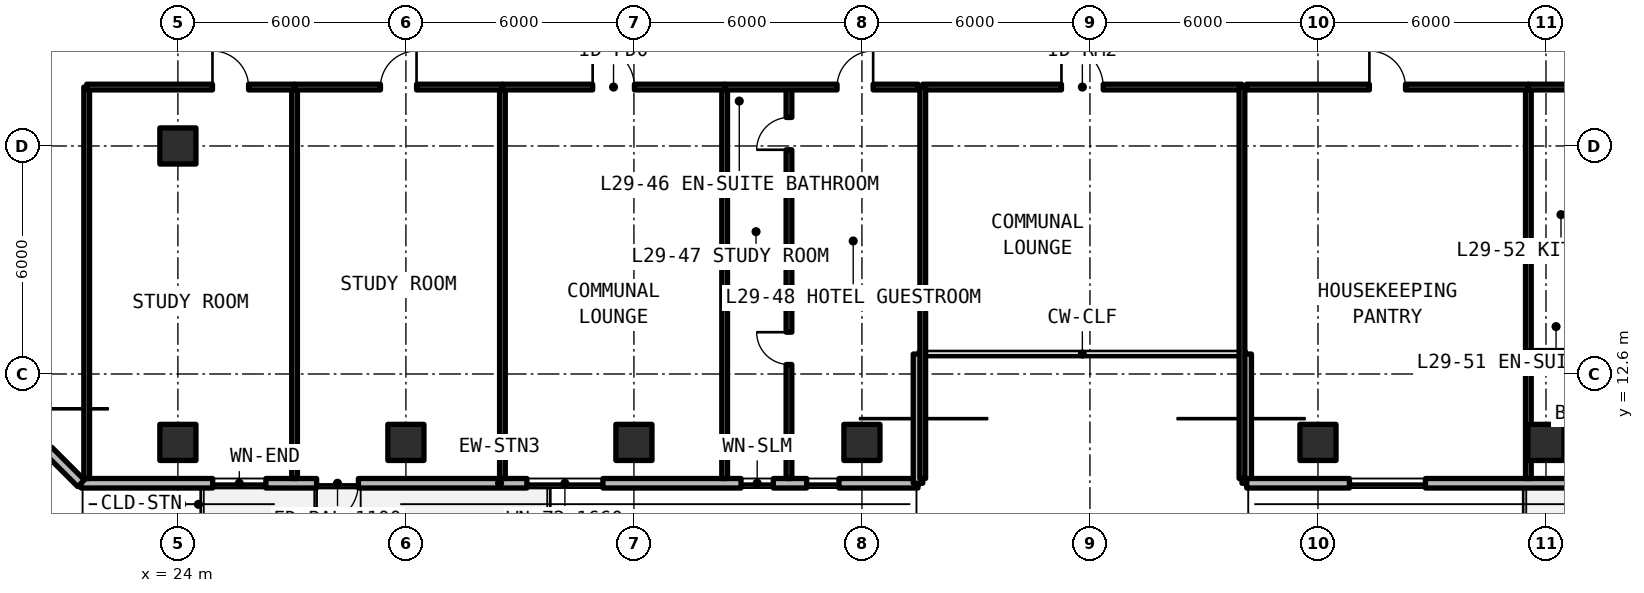
"""IFC4 building model, lengths in metres.
Left out: names, types, materials, properties, quantities, classifications, styles, units other than length and angle.
Written with IfcOpenShell. Run it as: python <this file> out.ifc"""

import sys

from ifc_helpers import new_model, si_unit, direction, frame, frame_2d, origin, origin_2d, place, context, subcontext, project, spatial, rectangle, extrude, element, fill, save


model = new_model("IFC4")
c1 = context("Model", 3, precision=1e-05, world=origin(), true_north=direction((0.0, 1.0)))
c2 = subcontext(c1, "Body", "Model", "MODEL_VIEW")
j1 = project(units=[si_unit("LENGTHUNIT", "METRE"), si_unit("PLANEANGLEUNIT", "RADIAN")], contexts=[c1])
p1 = place(None, origin())
s1 = spatial("IfcSite", under=j1, at=p1, CompositionType="ELEMENT")
p2 = place(p1, origin())
s2 = spatial("IfcBuilding", under=s1, at=p2, CompositionType="ELEMENT")
p3 = place(p2, frame((0.0, 0.0, 105.27)))
s3 = spatial("IfcBuildingStorey", under=s2, at=p3, CompositionType="ELEMENT", Elevation=105.27)
for number, where, z_axis, x_axis in (
    (1, (24.0, 18.6, 0.0), (0.0, 0.0, 1.0), (1.0, 0.0, 0.0)),
    (2, (24.0, 10.8, 0.0), (0.0, 0.0, 1.0), (1.0, 0.0, 0.0)),
    (3, (30.0, 10.8, 0.0), (0.0, 0.0, 1.0), (1.0, 0.0, 0.0)),
    (4, (36.0, 10.8, 0.0), (0.0, 0.0, 1.0), (1.0, 0.0, 0.0)),
    (5, (42.0, 10.8, 0.0), (0.0, 0.0, 1.0), (1.0, 0.0, 0.0)),
    (6, (54.0, 10.8, 0.0), (0.0, 0.0, 1.0), (1.0, 0.0, 0.0)),
    (7, (60.0, 10.8, 0.0), (0.0, 0.0, 1.0), (1.0, 0.0, 0.0)),
):
    element("IfcColumn", number, at=place(p3, frame(where, z_axis=z_axis, x_axis=x_axis)), inside=s3, PredefinedType="COLUMN", context=c2, shape_type="SweptSolid", body=[
        extrude(rectangle(XDim=0.95, YDim=0.95, at=origin_2d()), origin(), (0.0, 0.0, 1.0), 3.3),
    ])
p4 = place(p3, frame((21.452, 9.725, 0.0), z_axis=(0.0, 0.0, 1.0), x_axis=(1.0, 0.0, 0.0)))
e8 = element("IfcWall", 8, at=p4, inside=s3, PredefinedType="SOLIDWALL", context=c2, shape_type="SweptSolid", body=[
    extrude(rectangle(XDim=22.023, YDim=0.25, at=frame_2d((11.012, 0.0))), origin(), (0.0, 0.0, 1.0), 3.08),
])
p5 = place(p4, frame((6.198, 0.0, 0.0)))
e9 = element("IfcOpeningElement", 9, at=p5, cuts=e8, PredefinedType="OPENING", context=c2, shape_type="SweptSolid", body=[
    extrude(rectangle(XDim=1.1, YDim=2.15, at=frame_2d((0.55, 1.075))), frame((0.0, 0.135, 0.0), z_axis=(0.0, -1.0, 0.0), x_axis=(1.0, 0.0, 0.0)), (0.0, 0.0, 1.0), 0.27),
])
p6 = place(p4, frame((3.463, 0.0, 0.78)))
e10 = element("IfcOpeningElement", 10, at=p6, cuts=e8, PredefinedType="OPENING", context=c2, shape_type="SweptSolid", body=[
    extrude(rectangle(XDim=1.4, YDim=1.65, at=frame_2d((0.7, 0.825))), frame((0.0, 0.135, 0.0), z_axis=(0.0, -1.0, 0.0), x_axis=(1.0, 0.0, 0.0)), (0.0, 0.0, 1.0), 0.27),
])
p7 = place(p4, frame((11.732, 0.0, 0.78)))
e11 = element("IfcOpeningElement", 11, at=p7, cuts=e8, PredefinedType="OPENING", context=c2, shape_type="SweptSolid", body=[
    extrude(rectangle(XDim=2.0, YDim=1.66, at=frame_2d((1.0, 0.83))), frame((0.0, 0.135, 0.0), z_axis=(0.0, -1.0, 0.0), x_axis=(1.0, 0.0, 0.0)), (0.0, 0.0, 1.0), 0.27),
])
p8 = place(p4, frame((17.367, 0.0, 0.78)))
e12 = element("IfcOpeningElement", 12, at=p8, cuts=e8, PredefinedType="OPENING", context=c2, shape_type="SweptSolid", body=[
    extrude(rectangle(XDim=0.85, YDim=1.65, at=frame_2d((0.425, 0.825))), frame((0.0, 0.135, 0.0), z_axis=(0.0, -1.0, 0.0), x_axis=(1.0, 0.0, 0.0)), (0.0, 0.0, 1.0), 0.27),
])
p9 = place(p4, frame((19.093, 0.0, 0.78)))
e13 = element("IfcOpeningElement", 13, at=p9, cuts=e8, PredefinedType="OPENING", context=c2, shape_type="SweptSolid", body=[
    extrude(rectangle(XDim=0.85, YDim=1.65, at=frame_2d((0.425, 0.825))), frame((0.0, 0.135, 0.0), z_axis=(0.0, -1.0, 0.0), x_axis=(1.0, 0.0, 0.0)), (0.0, 0.0, 1.0), 0.27),
])
for number, where, z_axis, x_axis in (
    (14, (43.475, 9.725, 0.0), (0.0, 0.0, 1.0), (0.0, 1.0, 0.0)),
    (15, (52.125, 13.125, 0.0), (0.0, 0.0, 1.0), (0.0, -1.0, 0.0)),
):
    element("IfcWall", number, at=place(p3, frame(where, z_axis=z_axis, x_axis=x_axis)), inside=s3, PredefinedType="SOLIDWALL", context=c2, shape_type="SweptSolid", body=[
        extrude(rectangle(XDim=3.4, YDim=0.25, at=frame_2d((1.7, 0.0))), origin(), (0.0, 0.0, 1.0), 3.08),
    ])
p10 = place(p3, frame((52.125, 9.725, 0.0), z_axis=(0.0, 0.0, 1.0), x_axis=(1.0, 0.0, 0.0)))
e16 = element("IfcWall", 16, at=p10, inside=s3, PredefinedType="SOLIDWALL", context=c2, shape_type="SweptSolid", body=[
    extrude(rectangle(XDim=44.023, YDim=0.25, at=frame_2d((22.012, 0.0))), origin(), (0.0, 0.0, 1.0), 3.08),
])
p11 = place(p10, frame((11.075, 0.0, 0.0)))
e17 = element("IfcOpeningElement", 17, at=p11, cuts=e16, PredefinedType="OPENING", context=c2, shape_type="SweptSolid", body=[
    extrude(rectangle(XDim=1.1, YDim=2.15, at=frame_2d((0.55, 1.075))), frame((0.0, 0.135, 0.0), z_axis=(0.0, -1.0, 0.0), x_axis=(1.0, 0.0, 0.0)), (0.0, 0.0, 1.0), 0.27),
])
p12 = place(p10, frame((22.925, 0.0, 0.0)))
e18 = element("IfcOpeningElement", 18, at=p12, cuts=e16, PredefinedType="OPENING", context=c2, shape_type="SweptSolid", body=[
    extrude(rectangle(XDim=1.1, YDim=2.15, at=frame_2d((0.55, 1.075))), frame((0.0, 0.135, 0.0), z_axis=(0.0, -1.0, 0.0), x_axis=(1.0, 0.0, 0.0)), (0.0, 0.0, 1.0), 0.27),
])
p13 = place(p10, frame((35.525, 0.0, 0.0)))
e19 = element("IfcOpeningElement", 19, at=p13, cuts=e16, PredefinedType="OPENING", context=c2, shape_type="SweptSolid", body=[
    extrude(rectangle(XDim=1.1, YDim=2.15, at=frame_2d((0.55, 1.075))), frame((0.0, 0.135, 0.0), z_axis=(0.0, -1.0, 0.0), x_axis=(1.0, 0.0, 0.0)), (0.0, 0.0, 1.0), 0.27),
])
p14 = place(p10, frame((2.703, 0.0, 0.78)))
e20 = element("IfcOpeningElement", 20, at=p14, cuts=e16, PredefinedType="OPENING", context=c2, shape_type="SweptSolid", body=[
    extrude(rectangle(XDim=2.0, YDim=1.66, at=frame_2d((1.0, 0.83))), frame((0.0, 0.135, 0.0), z_axis=(0.0, -1.0, 0.0), x_axis=(1.0, 0.0, 0.0)), (0.0, 0.0, 1.0), 0.27),
])
p15 = place(p10, frame((28.964, 0.0, 0.78)))
e21 = element("IfcOpeningElement", 21, at=p15, cuts=e16, PredefinedType="OPENING", context=c2, shape_type="SweptSolid", body=[
    extrude(rectangle(XDim=2.0, YDim=1.66, at=frame_2d((1.0, 0.83))), frame((0.0, 0.135, 0.0), z_axis=(0.0, -1.0, 0.0), x_axis=(1.0, 0.0, 0.0)), (0.0, 0.0, 1.0), 0.27),
])
p16 = place(p3, frame((17.325, 13.852, 0.0), z_axis=(0.0, 0.0, 1.0), x_axis=(0.707127696864, -0.70708586489, 0.0)))
e22 = element("IfcWall", 22, at=p16, inside=s3, PredefinedType="SOLIDWALL", context=c2, shape_type="SweptSolid", body=[
    extrude(rectangle(XDim=5.836, YDim=0.25, at=frame_2d((2.918, 0.0))), origin(), (0.0, 0.0, 1.0), 3.08),
])
p17 = place(p16, frame((1.218, 0.0, 0.78)))
e23 = element("IfcOpeningElement", 23, at=p17, cuts=e22, PredefinedType="OPENING", context=c2, shape_type="SweptSolid", body=[
    extrude(rectangle(XDim=3.4, YDim=1.66, at=frame_2d((1.7, 0.83))), frame((0.0, 0.135, 0.0), z_axis=(0.0, -1.0, 0.0), x_axis=(1.0, 0.0, 0.0)), (0.0, 0.0, 1.0), 0.27),
])
p18 = place(p3, frame((43.6, 20.15, 0.0), z_axis=(0.0, 0.0, 1.0), x_axis=(1.0, 0.0, 0.0)))
e24 = element("IfcWall", 24, at=p18, inside=s3, PredefinedType="SOLIDWALL", context=c2, shape_type="SweptSolid", body=[
    extrude(rectangle(XDim=8.4, YDim=0.15, at=frame_2d((4.2, 0.0))), origin(), (0.0, 0.0, 1.0), 2.35),
])
p19 = place(p18, frame((3.65, 0.0, 0.0)))
e25 = element("IfcOpeningElement", 25, at=p19, cuts=e24, PredefinedType="OPENING", context=c2, shape_type="SweptSolid", body=[
    extrude(rectangle(XDim=1.1, YDim=2.15, at=frame_2d((0.55, 1.075))), frame((0.0, 0.085, 0.0), z_axis=(0.0, -1.0, 0.0), x_axis=(1.0, 0.0, 0.0)), (0.0, 0.0, 1.0), 0.17),
])
for number, where, z_axis, x_axis in (
    (26, (43.6, 9.85, 0.0), (0.0, 0.0, 1.0), (0.0, 1.0, 0.0)),
    (27, (52.0, 9.85, 0.0), (0.0, 0.0, 1.0), (0.0, 1.0, 0.0)),
    (28, (21.6, 9.85, 0.0), (0.0, 0.0, 1.0), (0.0, 1.0, 0.0)),
    (29, (27.07, 9.85, 0.0), (0.0, 0.0, 1.0), (0.0, 1.0, 0.0)),
):
    element("IfcWall", number, at=place(p3, frame(where, z_axis=z_axis, x_axis=x_axis)), inside=s3, PredefinedType="SOLIDWALL", context=c2, shape_type="SweptSolid", body=[
        extrude(rectangle(XDim=10.3, YDim=0.15, at=frame_2d((5.15, 0.0))), origin(), (0.0, 0.0, 1.0), 2.35),
    ])
p20 = place(p3, frame((21.6, 20.15, 0.0), z_axis=(0.0, 0.0, 1.0), x_axis=(1.0, 0.0, 0.0)))
e30 = element("IfcWall", 30, at=p20, inside=s3, PredefinedType="SOLIDWALL", context=c2, shape_type="SweptSolid", body=[
    extrude(rectangle(XDim=5.47, YDim=0.15, at=frame_2d((2.735, 0.0))), origin(), (0.0, 0.0, 1.0), 2.35),
])
p21 = place(p20, frame((3.31, 0.0, 0.0)))
e31 = element("IfcOpeningElement", 31, at=p21, cuts=e30, PredefinedType="OPENING", context=c2, shape_type="SweptSolid", body=[
    extrude(rectangle(XDim=0.95, YDim=2.15, at=frame_2d((0.475, 1.075))), frame((0.0, 0.085, 0.0), z_axis=(0.0, -1.0, 0.0), x_axis=(1.0, 0.0, 0.0)), (0.0, 0.0, 1.0), 0.17),
])
p22 = place(p3, frame((32.54, 9.85, 0.0), z_axis=(0.0, 0.0, 1.0), x_axis=(0.0, 1.0, 0.0)))
e32 = element("IfcWall", 32, at=p22, inside=s3, PredefinedType="SOLIDWALL", context=c2, shape_type="SweptSolid", body=[
    extrude(rectangle(XDim=10.3, YDim=0.15, at=frame_2d((5.15, 0.0))), origin(), (0.0, 0.0, 1.0), 2.35),
])
p23 = place(p3, frame((27.07, 20.15, 0.0), z_axis=(0.0, 0.0, 1.0), x_axis=(1.0, 0.0, 0.0)))
e33 = element("IfcWall", 33, at=p23, inside=s3, PredefinedType="SOLIDWALL", context=c2, shape_type="SweptSolid", body=[
    extrude(rectangle(XDim=5.47, YDim=0.15, at=frame_2d((2.735, 0.0))), origin(), (0.0, 0.0, 1.0), 2.35),
])
p24 = place(p23, frame((2.26, 0.0, 0.0)))
e34 = element("IfcOpeningElement", 34, at=p24, cuts=e33, PredefinedType="OPENING", context=c2, shape_type="SweptSolid", body=[
    extrude(rectangle(XDim=0.95, YDim=2.15, at=frame_2d((0.475, 1.075))), frame((0.0, 0.085, 0.0), z_axis=(0.0, -1.0, 0.0), x_axis=(1.0, 0.0, 0.0)), (0.0, 0.0, 1.0), 0.17),
])
p25 = place(p3, frame((38.387, 9.85, 0.0), z_axis=(0.0, 0.0, 1.0), x_axis=(0.0, 1.0, 0.0)))
e35 = element("IfcWall", 35, at=p25, inside=s3, PredefinedType="SOLIDWALL", context=c2, shape_type="SweptSolid", body=[
    extrude(rectangle(XDim=10.3, YDim=0.15, at=frame_2d((5.15, 0.0))), origin(), (0.0, 0.0, 1.0), 2.35),
])
p26 = place(p3, frame((32.54, 20.15, 0.0), z_axis=(0.0, 0.0, 1.0), x_axis=(1.0, 0.0, 0.0)))
e36 = element("IfcWall", 36, at=p26, inside=s3, PredefinedType="SOLIDWALL", context=c2, shape_type="SweptSolid", body=[
    extrude(rectangle(XDim=5.847, YDim=0.15, at=frame_2d((2.924, 0.0))), origin(), (0.0, 0.0, 1.0), 2.35),
])
p27 = place(p26, frame((2.374, 0.0, 0.0)))
e37 = element("IfcOpeningElement", 37, at=p27, cuts=e36, PredefinedType="OPENING", context=c2, shape_type="SweptSolid", body=[
    extrude(rectangle(XDim=1.1, YDim=2.15, at=frame_2d((0.55, 1.075))), frame((0.0, 0.085, 0.0), z_axis=(0.0, -1.0, 0.0), x_axis=(1.0, 0.0, 0.0)), (0.0, 0.0, 1.0), 0.17),
])
p28 = place(p3, frame((38.387, 17.7, 0.0), z_axis=(0.0, 0.0, 1.0), x_axis=(1.0, 0.0, 0.0)))
e38 = element("IfcWall", 38, at=p28, inside=s3, PredefinedType="PARTITIONING", context=c2, shape_type="SweptSolid", body=[
    extrude(rectangle(XDim=1.693, YDim=0.15, at=frame_2d((0.846, 0.0))), origin(), (0.0, 0.0, 1.0), 2.35),
])
p29 = place(p3, frame((40.08, 9.85, 0.0), z_axis=(0.0, 0.0, 1.0), x_axis=(0.0, 1.0, 0.0)))
e39 = element("IfcWall", 39, at=p29, inside=s3, PredefinedType="PARTITIONING", context=c2, shape_type="SweptSolid", body=[
    extrude(rectangle(XDim=10.3, YDim=0.15, at=frame_2d((5.15, 0.0))), origin(), (0.0, 0.0, 1.0), 2.35),
])
p30 = place(p29, frame((3.0, 0.0, 0.0)))
e40 = element("IfcOpeningElement", 40, at=p30, cuts=e39, PredefinedType="OPENING", context=c2, shape_type="SweptSolid", body=[
    extrude(rectangle(XDim=0.85, YDim=2.1, at=frame_2d((0.425, 1.05))), frame((0.0, 0.085, 0.0), z_axis=(0.0, -1.0, 0.0), x_axis=(1.0, 0.0, 0.0)), (0.0, 0.0, 1.0), 0.17),
])
p31 = place(p29, frame((8.65, 0.0, 0.0)))
e41 = element("IfcOpeningElement", 41, at=p31, cuts=e39, PredefinedType="OPENING", context=c2, shape_type="SweptSolid", body=[
    extrude(rectangle(XDim=0.85, YDim=2.1, at=frame_2d((0.425, 1.05))), frame((0.0, 0.085, 0.0), z_axis=(0.0, -1.0, 0.0), x_axis=(1.0, 0.0, 0.0)), (0.0, 0.0, 1.0), 0.17),
])
p32 = place(p3, frame((38.387, 20.15, 0.0), z_axis=(0.0, 0.0, 1.0), x_axis=(1.0, 0.0, 0.0)))
e42 = element("IfcWall", 42, at=p32, inside=s3, PredefinedType="SOLIDWALL", context=c2, shape_type="SweptSolid", body=[
    extrude(rectangle(XDim=5.093, YDim=0.15, at=frame_2d((2.546, 0.0))), origin(), (0.0, 0.0, 1.0), 2.35),
])
p33 = place(p32, frame((2.958, 0.0, 0.0)))
e43 = element("IfcOpeningElement", 43, at=p33, cuts=e42, PredefinedType="OPENING", context=c2, shape_type="SweptSolid", body=[
    extrude(rectangle(XDim=0.95, YDim=2.15, at=frame_2d((0.475, 1.075))), frame((0.0, 0.085, 0.0), z_axis=(0.0, -1.0, 0.0), x_axis=(1.0, 0.0, 0.0)), (0.0, 0.0, 1.0), 0.17),
])
p34 = place(p3, frame((59.536, 9.85, 0.0), z_axis=(0.0, 0.0, 1.0), x_axis=(0.0, 1.0, 0.0)))
e44 = element("IfcWall", 44, at=p34, inside=s3, PredefinedType="SOLIDWALL", context=c2, shape_type="SweptSolid", body=[
    extrude(rectangle(XDim=10.3, YDim=0.15, at=frame_2d((5.15, 0.0))), origin(), (0.0, 0.0, 1.0), 2.35),
])
p35 = place(p3, frame((52.12, 20.15, 0.0), z_axis=(0.0, 0.0, 1.0), x_axis=(1.0, 0.0, 0.0)))
e45 = element("IfcWall", 45, at=p35, inside=s3, PredefinedType="SOLIDWALL", context=c2, shape_type="SweptSolid", body=[
    extrude(rectangle(XDim=7.416, YDim=0.15, at=frame_2d((3.708, 0.0))), origin(), (0.0, 0.0, 1.0), 2.35),
])
p36 = place(p35, frame((3.233, 0.0, 0.0)))
e46 = element("IfcOpeningElement", 46, at=p36, cuts=e45, PredefinedType="OPENING", context=c2, shape_type="SweptSolid", body=[
    extrude(rectangle(XDim=0.95, YDim=2.15, at=frame_2d((0.475, 1.075))), frame((0.0, 0.085, 0.0), z_axis=(0.0, -1.0, 0.0), x_axis=(1.0, 0.0, 0.0)), (0.0, 0.0, 1.0), 0.17),
])
p37 = place(p3, frame((59.536, 16.015, 0.0), z_axis=(0.0, 0.0, 1.0), x_axis=(1.0, 0.0, 0.0)))
e47 = element("IfcWall", 47, at=p37, inside=s3, PredefinedType="PARTITIONING", context=c2, shape_type="SweptSolid", body=[
    extrude(rectangle(XDim=2.384, YDim=0.15, at=frame_2d((1.192, 0.0))), origin(), (0.0, 0.0, 1.0), 2.35),
])
p38 = place(p3, frame((59.536, 13.142, 0.0), z_axis=(0.0, 0.0, 1.0), x_axis=(1.0, 0.0, 0.0)))
e48 = element("IfcWall", 48, at=p38, inside=s3, PredefinedType="PARTITIONING", context=c2, shape_type="SweptSolid", body=[
    extrude(rectangle(XDim=8.961, YDim=0.15, at=frame_2d((4.481, 0.0))), origin(), (0.0, 0.0, 1.0), 2.35),
])
p39 = place(p38, frame((5.288, 0.0, 0.0)))
e49 = element("IfcOpeningElement", 49, at=p39, cuts=e48, PredefinedType="OPENING", context=c2, shape_type="SweptSolid", body=[
    extrude(rectangle(XDim=0.85, YDim=2.1, at=frame_2d((0.425, 1.05))), frame((0.0, 0.085, 0.0), z_axis=(0.0, -1.0, 0.0), x_axis=(1.0, 0.0, 0.0)), (0.0, 0.0, 1.0), 0.17),
])
p40 = place(p3, frame((59.536, 20.15, 0.0), z_axis=(0.0, 0.0, 1.0), x_axis=(1.0, 0.0, 0.0)))
e50 = element("IfcWall", 50, at=p40, inside=s3, PredefinedType="SOLIDWALL", context=c2, shape_type="SweptSolid", body=[
    extrude(rectangle(XDim=8.961, YDim=0.15, at=frame_2d((4.481, 0.0))), origin(), (0.0, 0.0, 1.0), 2.35),
])
p41 = place(p40, frame((5.238, 0.0, 0.0)))
e51 = element("IfcOpeningElement", 51, at=p41, cuts=e50, PredefinedType="OPENING", context=c2, shape_type="SweptSolid", body=[
    extrude(rectangle(XDim=0.95, YDim=2.15, at=frame_2d((0.475, 1.075))), frame((0.0, 0.085, 0.0), z_axis=(0.0, -1.0, 0.0), x_axis=(1.0, 0.0, 0.0)), (0.0, 0.0, 1.0), 0.17),
])
p42 = place(p5, frame((1.1, 0.0, 0.0), z_axis=(0.0, 0.0, 1.0), x_axis=(-1.0, 0.0, 0.0)))
e52 = element("IfcDoor", 52, at=p42, inside=s3, OperationType="SINGLE_SWING_RIGHT", PredefinedType="DOOR", context=c2, shape_type="SweptSolid", body=[
    extrude(rectangle(XDim=1.1, YDim=2.15, at=frame_2d((0.55, 1.075))), frame((0.0, 0.025, 0.0), z_axis=(0.0, -1.0, 0.0), x_axis=(1.0, 0.0, 0.0)), (0.0, 0.0, 1.0), 0.05),
])
fill(e9, e52)
p43 = place(p6, origin())
e53 = element("IfcWindow", 53, at=p43, inside=s3, PartitioningType="SINGLE_PANEL", PredefinedType="WINDOW", context=c2, shape_type="SweptSolid", body=[
    extrude(rectangle(XDim=1.4, YDim=1.65, at=frame_2d((0.7, 0.825))), frame((0.0, 0.03, 0.0), z_axis=(0.0, -1.0, 0.0), x_axis=(1.0, 0.0, 0.0)), (0.0, 0.0, 1.0), 0.06),
])
fill(e10, e53)
p44 = place(p7, origin())
e54 = element("IfcWindow", 54, at=p44, inside=s3, PartitioningType="SINGLE_PANEL", PredefinedType="WINDOW", context=c2, shape_type="SweptSolid", body=[
    extrude(rectangle(XDim=2.0, YDim=1.66, at=frame_2d((1.0, 0.83))), frame((0.0, 0.03, 0.0), z_axis=(0.0, -1.0, 0.0), x_axis=(1.0, 0.0, 0.0)), (0.0, 0.0, 1.0), 0.06),
])
fill(e11, e54)
p45 = place(p8, origin())
e55 = element("IfcWindow", 55, at=p45, inside=s3, PartitioningType="SINGLE_PANEL", PredefinedType="WINDOW", context=c2, shape_type="SweptSolid", body=[
    extrude(rectangle(XDim=0.85, YDim=1.65, at=frame_2d((0.425, 0.825))), frame((0.0, 0.03, 0.0), z_axis=(0.0, -1.0, 0.0), x_axis=(1.0, 0.0, 0.0)), (0.0, 0.0, 1.0), 0.06),
])
fill(e12, e55)
p46 = place(p9, origin())
e56 = element("IfcWindow", 56, at=p46, inside=s3, PartitioningType="SINGLE_PANEL", PredefinedType="WINDOW", context=c2, shape_type="SweptSolid", body=[
    extrude(rectangle(XDim=0.85, YDim=1.65, at=frame_2d((0.425, 0.825))), frame((0.0, 0.03, 0.0), z_axis=(0.0, -1.0, 0.0), x_axis=(1.0, 0.0, 0.0)), (0.0, 0.0, 1.0), 0.06),
])
fill(e13, e56)
p47 = place(p14, origin())
e57 = element("IfcWindow", 57, at=p47, inside=s3, PartitioningType="SINGLE_PANEL", PredefinedType="WINDOW", context=c2, shape_type="SweptSolid", body=[
    extrude(rectangle(XDim=2.0, YDim=1.66, at=frame_2d((1.0, 0.83))), frame((0.0, 0.03, 0.0), z_axis=(0.0, -1.0, 0.0), x_axis=(1.0, 0.0, 0.0)), (0.0, 0.0, 1.0), 0.06),
])
fill(e20, e57)
p48 = place(p19, origin())
e58 = element("IfcDoor", 58, at=p48, inside=s3, OperationType="SINGLE_SWING_LEFT", PredefinedType="DOOR", context=c2, shape_type="SweptSolid", body=[
    extrude(rectangle(XDim=1.1, YDim=2.15, at=frame_2d((0.55, 1.075))), frame((0.0, 0.025, 0.0), z_axis=(0.0, -1.0, 0.0), x_axis=(1.0, 0.0, 0.0)), (0.0, 0.0, 1.0), 0.05),
])
fill(e25, e58)
p49 = place(p21, origin())
e59 = element("IfcDoor", 59, at=p49, inside=s3, OperationType="SINGLE_SWING_LEFT", PredefinedType="DOOR", context=c2, shape_type="SweptSolid", body=[
    extrude(rectangle(XDim=0.95, YDim=2.15, at=frame_2d((0.475, 1.075))), frame((0.0, 0.025, 0.0), z_axis=(0.0, -1.0, 0.0), x_axis=(1.0, 0.0, 0.0)), (0.0, 0.0, 1.0), 0.05),
])
fill(e31, e59)
p50 = place(p24, origin())
e60 = element("IfcDoor", 60, at=p50, inside=s3, OperationType="SINGLE_SWING_RIGHT", PredefinedType="DOOR", context=c2, shape_type="SweptSolid", body=[
    extrude(rectangle(XDim=0.95, YDim=2.15, at=frame_2d((0.475, 1.075))), frame((0.0, 0.025, 0.0), z_axis=(0.0, -1.0, 0.0), x_axis=(1.0, 0.0, 0.0)), (0.0, 0.0, 1.0), 0.05),
])
fill(e34, e60)
p51 = place(p27, origin())
e61 = element("IfcDoor", 61, at=p51, inside=s3, OperationType="SINGLE_SWING_LEFT", PredefinedType="DOOR", context=c2, shape_type="SweptSolid", body=[
    extrude(rectangle(XDim=1.1, YDim=2.15, at=frame_2d((0.55, 1.075))), frame((0.0, 0.025, 0.0), z_axis=(0.0, -1.0, 0.0), x_axis=(1.0, 0.0, 0.0)), (0.0, 0.0, 1.0), 0.05),
])
fill(e37, e61)
p52 = place(p30, origin())
e62 = element("IfcDoor", 62, at=p52, inside=s3, OperationType="SINGLE_SWING_RIGHT", PredefinedType="DOOR", context=c2, shape_type="SweptSolid", body=[
    extrude(rectangle(XDim=0.85, YDim=2.1, at=frame_2d((0.425, 1.05))), frame((0.0, 0.025, 0.0), z_axis=(0.0, -1.0, 0.0), x_axis=(1.0, 0.0, 0.0)), (0.0, 0.0, 1.0), 0.05),
])
fill(e40, e62)
p53 = place(p31, origin())
e63 = element("IfcDoor", 63, at=p53, inside=s3, OperationType="SINGLE_SWING_LEFT", PredefinedType="DOOR", context=c2, shape_type="SweptSolid", body=[
    extrude(rectangle(XDim=0.85, YDim=2.1, at=frame_2d((0.425, 1.05))), frame((0.0, 0.025, 0.0), z_axis=(0.0, -1.0, 0.0), x_axis=(1.0, 0.0, 0.0)), (0.0, 0.0, 1.0), 0.05),
])
fill(e41, e63)
p54 = place(p33, origin())
e64 = element("IfcDoor", 64, at=p54, inside=s3, OperationType="SINGLE_SWING_RIGHT", PredefinedType="DOOR", context=c2, shape_type="SweptSolid", body=[
    extrude(rectangle(XDim=0.95, YDim=2.15, at=frame_2d((0.475, 1.075))), frame((0.0, 0.025, 0.0), z_axis=(0.0, -1.0, 0.0), x_axis=(1.0, 0.0, 0.0)), (0.0, 0.0, 1.0), 0.05),
])
fill(e43, e64)
p55 = place(p36, origin())
e65 = element("IfcDoor", 65, at=p55, inside=s3, OperationType="SINGLE_SWING_LEFT", PredefinedType="DOOR", context=c2, shape_type="SweptSolid", body=[
    extrude(rectangle(XDim=0.95, YDim=2.15, at=frame_2d((0.475, 1.075))), frame((0.0, 0.025, 0.0), z_axis=(0.0, -1.0, 0.0), x_axis=(1.0, 0.0, 0.0)), (0.0, 0.0, 1.0), 0.05),
])
fill(e46, e65)
save(model, sys.argv[1])
